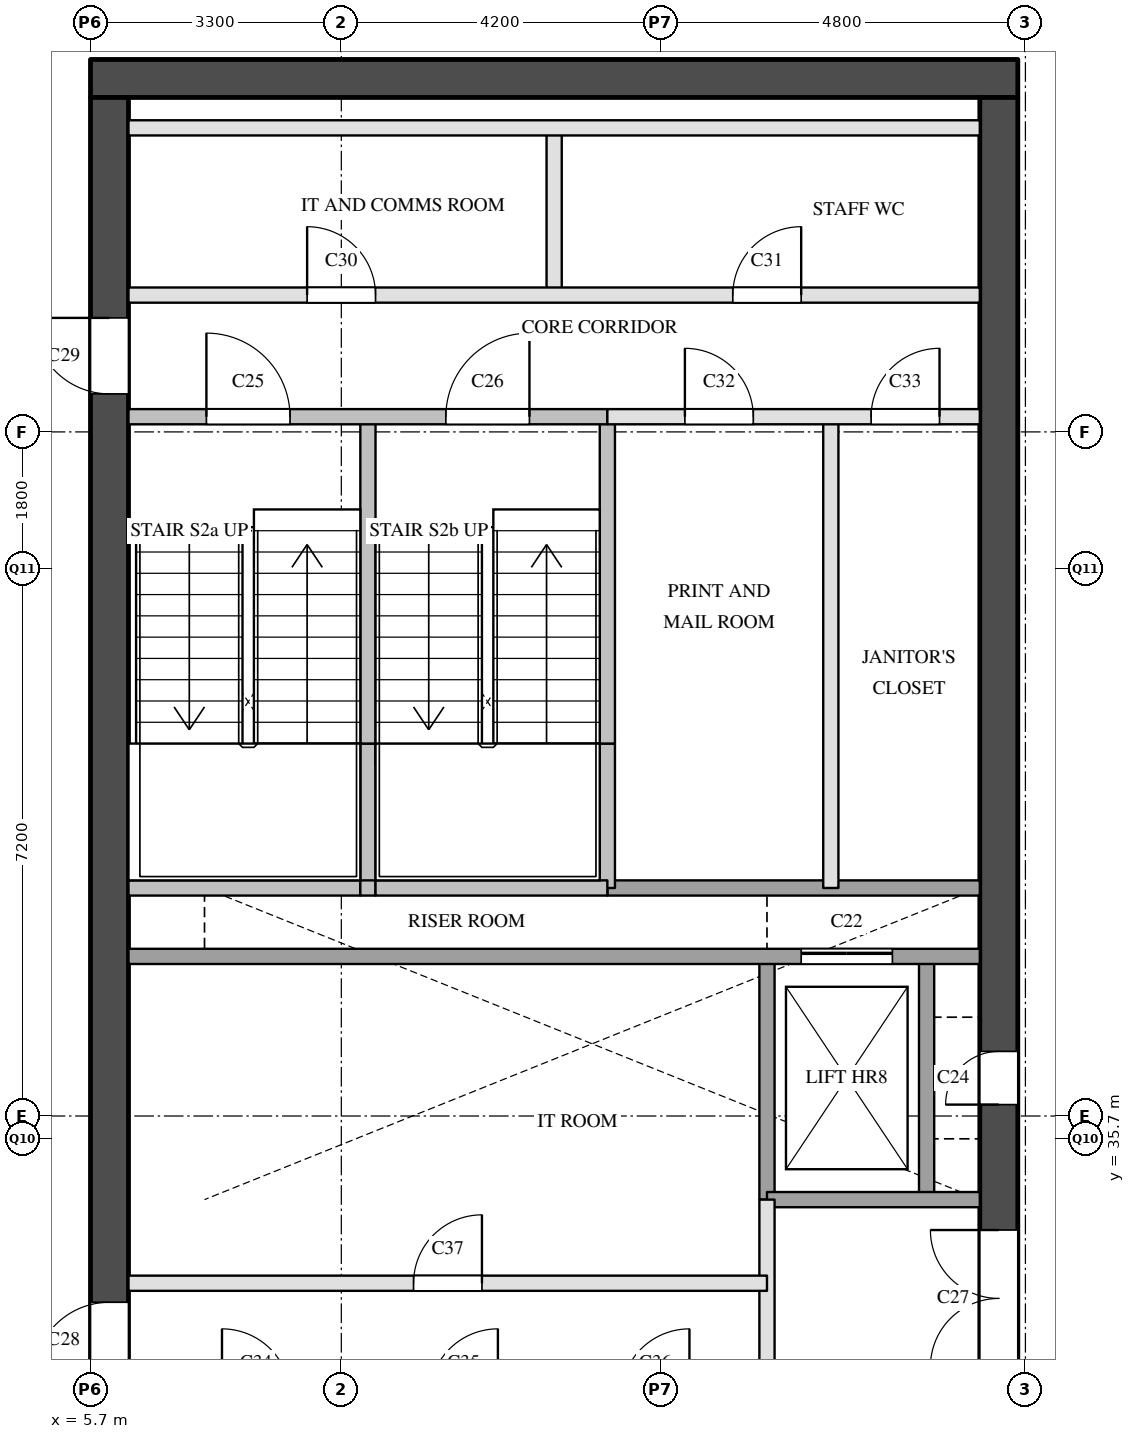
"""IFC4 building model, lengths in metres.
Left out: names, types, materials, properties, quantities, classifications, styles, units other than length and angle.
Written with IfcOpenShell. Run it as: python <this file> out.ifc"""

import sys

from ifc_helpers import new_model, si_unit, direction, frame, frame_2d, origin, place, context, subcontext, project, spatial, rectangle, extrude, element, fill, save


model = new_model("IFC4")
c1 = context("Model", 3, precision=1e-05, world=origin(), true_north=direction((0.0, 1.0)))
c2 = subcontext(c1, "Body", "Model", "MODEL_VIEW")
j1 = project(units=[si_unit("LENGTHUNIT", "METRE"), si_unit("PLANEANGLEUNIT", "RADIAN")], contexts=[c1])
p1 = place(None, origin())
s1 = spatial("IfcSite", under=j1, at=p1, CompositionType="ELEMENT")
p2 = place(p1, origin())
s2 = spatial("IfcBuilding", under=s1, at=p2, CompositionType="ELEMENT")
p3 = place(p2, frame((0.0, 0.0, 158.3)))
s3 = spatial("IfcBuildingStorey", under=s2, at=p3, CompositionType="ELEMENT", Elevation=158.3)
p4 = place(p3, frame((5.7, 49.65, 0.0), z_axis=(0.0, 0.0, 1.0), x_axis=(1.0, 0.0, 0.0)))
e1 = element("IfcWall", 1, at=p4, inside=s3, PredefinedType="SHEAR", context=c2, shape_type="SweptSolid", body=[
    extrude(rectangle(XDim=12.2, YDim=0.5, at=frame_2d((6.1, 0.0))), origin(), (0.0, 0.0, 1.0), 3.6),
])
p5 = place(p3, frame((5.95, 29.1, 0.0), z_axis=(0.0, 0.0, 1.0), x_axis=(0.0, 1.0, 0.0)))
e2 = element("IfcWall", 2, at=p5, inside=s3, PredefinedType="SHEAR", context=c2, shape_type="SweptSolid", body=[
    extrude(rectangle(XDim=20.3, YDim=0.5, at=frame_2d((10.15, 0.0))), origin(), (0.0, 0.0, 1.0), 3.6),
])
p6 = place(p5, frame((3.45, 0.0, 0.0)))
e3 = element("IfcOpeningElement", 3, at=p6, cuts=e2, PredefinedType="OPENING", context=c2, shape_type="SweptSolid", body=[
    extrude(rectangle(XDim=1.0, YDim=2.1, at=frame_2d((0.5, 1.05))), frame((0.0, 0.26, 0.0), z_axis=(0.0, -1.0, 0.0), x_axis=(1.0, 0.0, 0.0)), (0.0, 0.0, 1.0), 0.52),
])
p7 = place(p5, frame((16.4, 0.0, 0.0)))
e4 = element("IfcOpeningElement", 4, at=p7, cuts=e2, PredefinedType="OPENING", context=c2, shape_type="SweptSolid", body=[
    extrude(rectangle(XDim=1.0, YDim=2.1, at=frame_2d((0.5, 1.05))), frame((0.0, 0.26, 0.0), z_axis=(0.0, -1.0, 0.0), x_axis=(1.0, 0.0, 0.0)), (0.0, 0.0, 1.0), 0.52),
])
p8 = place(p3, frame((17.65, 29.1, 0.0), z_axis=(0.0, 0.0, 1.0), x_axis=(0.0, 1.0, 0.0)))
e5 = element("IfcWall", 5, at=p8, inside=s3, PredefinedType="SHEAR", context=c2, shape_type="SweptSolid", body=[
    extrude(rectangle(XDim=20.3, YDim=0.5, at=frame_2d((10.15, 0.0))), origin(), (0.0, 0.0, 1.0), 3.6),
])
p9 = place(p8, frame((1.25, 0.0, 0.0)))
e6 = element("IfcOpeningElement", 6, at=p9, cuts=e5, PredefinedType="OPENING", context=c2, shape_type="SweptSolid", body=[
    extrude(rectangle(XDim=0.7, YDim=2.1, at=frame_2d((0.35, 1.05))), frame((0.0, 0.26, 0.0), z_axis=(0.0, -1.0, 0.0), x_axis=(1.0, 0.0, 0.0)), (0.0, 0.0, 1.0), 0.52),
])
p10 = place(p8, frame((7.05, 0.0, 0.0)))
e7 = element("IfcOpeningElement", 7, at=p10, cuts=e5, PredefinedType="OPENING", context=c2, shape_type="SweptSolid", body=[
    extrude(rectangle(XDim=0.7, YDim=2.1, at=frame_2d((0.35, 1.05))), frame((0.0, 0.26, 0.0), z_axis=(0.0, -1.0, 0.0), x_axis=(1.0, 0.0, 0.0)), (0.0, 0.0, 1.0), 0.52),
])
p11 = place(p8, frame((3.6, 0.0, 0.0)))
e8 = element("IfcOpeningElement", 8, at=p11, cuts=e5, PredefinedType="OPENING", context=c2, shape_type="SweptSolid", body=[
    extrude(rectangle(XDim=1.8, YDim=2.1, at=frame_2d((0.9, 1.05))), frame((0.0, 0.26, 0.0), z_axis=(0.0, -1.0, 0.0), x_axis=(1.0, 0.0, 0.0)), (0.0, 0.0, 1.0), 0.52),
])
p12 = place(p3, frame((9.35, 39.0, 0.0), z_axis=(0.0, 0.0, 1.0), x_axis=(0.0, 1.0, 0.0)))
e9 = element("IfcWall", 9, at=p12, inside=s3, PredefinedType="SOLIDWALL", context=c2, shape_type="SweptSolid", body=[
    extrude(rectangle(XDim=1.9, YDim=0.2, at=frame_2d((0.95, 0.0))), origin(), (0.0, 0.0, 1.0), 3.6),
])
p13 = place(p3, frame((9.35, 40.9, 0.0), z_axis=(0.0, 0.0, 1.0), x_axis=(0.0, 1.0, 0.0)))
e10 = element("IfcWall", 10, at=p13, inside=s3, PredefinedType="SOLIDWALL", context=c2, shape_type="SweptSolid", body=[
    extrude(rectangle(XDim=4.3, YDim=0.2, at=frame_2d((2.15, 0.0))), origin(), (0.0, 0.0, 1.0), 3.6),
])
p14 = place(p3, frame((11.8, 46.8, 0.0), z_axis=(0.0, 0.0, 1.0), x_axis=(0.0, 1.0, 0.0)))
e11 = element("IfcWall", 11, at=p14, inside=s3, PredefinedType="PARTITIONING", context=c2, shape_type="SweptSolid", body=[
    extrude(rectangle(XDim=2.2, YDim=0.2, at=frame_2d((1.1, 0.0))), origin(), (0.0, 0.0, 1.0), 3.6),
])
p15 = place(p3, frame((12.5, 39.0, 0.0), z_axis=(0.0, 0.0, 1.0), x_axis=(0.0, 1.0, 0.0)))
e12 = element("IfcWall", 12, at=p15, inside=s3, PredefinedType="SOLIDWALL", context=c2, shape_type="SweptSolid", body=[
    extrude(rectangle(XDim=1.9, YDim=0.2, at=frame_2d((0.95, 0.0))), origin(), (0.0, 0.0, 1.0), 3.6),
])
p16 = place(p3, frame((12.5, 40.9, 0.0), z_axis=(0.0, 0.0, 1.0), x_axis=(0.0, 1.0, 0.0)))
e13 = element("IfcWall", 13, at=p16, inside=s3, PredefinedType="SOLIDWALL", context=c2, shape_type="SweptSolid", body=[
    extrude(rectangle(XDim=4.3, YDim=0.2, at=frame_2d((2.15, 0.0))), origin(), (0.0, 0.0, 1.0), 3.6),
])
p17 = place(p3, frame((14.6, 32.3, 0.0), z_axis=(0.0, 0.0, 1.0), x_axis=(0.0, 1.0, 0.0)))
e14 = element("IfcWall", 14, at=p17, inside=s3, PredefinedType="PARTITIONING", context=c2, shape_type="SweptSolid", body=[
    extrude(rectangle(XDim=2.6, YDim=0.2, at=frame_2d((1.3, 0.0))), origin(), (0.0, 0.0, 1.0), 3.6),
])
p18 = place(p3, frame((14.6, 34.9, 0.0), z_axis=(0.0, 0.0, 1.0), x_axis=(0.0, 1.0, 0.0)))
e15 = element("IfcWall", 15, at=p18, inside=s3, PredefinedType="SOLIDWALL", context=c2, shape_type="SweptSolid", body=[
    extrude(rectangle(XDim=3.2, YDim=0.2, at=frame_2d((1.6, 0.0))), origin(), (0.0, 0.0, 1.0), 3.6),
])
p19 = place(p3, frame((15.44, 39.0, 0.0), z_axis=(0.0, 0.0, 1.0), x_axis=(0.0, 1.0, 0.0)))
e16 = element("IfcWall", 16, at=p19, inside=s3, PredefinedType="PARTITIONING", context=c2, shape_type="SweptSolid", body=[
    extrude(rectangle(XDim=6.2, YDim=0.2, at=frame_2d((3.1, 0.0))), origin(), (0.0, 0.0, 1.0), 3.6),
])
p20 = place(p3, frame((16.7, 34.9, 0.0), z_axis=(0.0, 0.0, 1.0), x_axis=(0.0, 1.0, 0.0)))
e17 = element("IfcWall", 17, at=p20, inside=s3, PredefinedType="SOLIDWALL", context=c2, shape_type="SweptSolid", body=[
    extrude(rectangle(XDim=3.2, YDim=0.2, at=frame_2d((1.6, 0.0))), origin(), (0.0, 0.0, 1.0), 3.6),
])
p21 = place(p3, frame((6.2, 33.8, 0.0), z_axis=(0.0, 0.0, 1.0), x_axis=(1.0, 0.0, 0.0)))
e18 = element("IfcWall", 18, at=p21, inside=s3, PredefinedType="PARTITIONING", context=c2, shape_type="SweptSolid", body=[
    extrude(rectangle(XDim=8.4, YDim=0.2, at=frame_2d((4.2, 0.0))), origin(), (0.0, 0.0, 1.0), 3.6),
])
p22 = place(p21, frame((3.75, 0.0, 0.0)))
e19 = element("IfcOpeningElement", 19, at=p22, cuts=e18, PredefinedType="OPENING", context=c2, shape_type="SweptSolid", body=[
    extrude(rectangle(XDim=0.9, YDim=2.1, at=frame_2d((0.45, 1.05))), frame((0.0, 0.11, 0.0), z_axis=(0.0, -1.0, 0.0), x_axis=(1.0, 0.0, 0.0)), (0.0, 0.0, 1.0), 0.22),
])
p23 = place(p3, frame((14.6, 34.9, 0.0), z_axis=(0.0, 0.0, 1.0), x_axis=(1.0, 0.0, 0.0)))
e20 = element("IfcWall", 20, at=p23, inside=s3, PredefinedType="SOLIDWALL", context=c2, shape_type="SweptSolid", body=[
    extrude(rectangle(XDim=2.8, YDim=0.2, at=frame_2d((1.4, 0.0))), origin(), (0.0, 0.0, 1.0), 3.6),
])
p24 = place(p3, frame((6.2, 38.1, 0.0), z_axis=(0.0, 0.0, 1.0), x_axis=(1.0, 0.0, 0.0)))
e21 = element("IfcWall", 21, at=p24, inside=s3, PredefinedType="SOLIDWALL", context=c2, shape_type="SweptSolid", body=[
    extrude(rectangle(XDim=11.2, YDim=0.2, at=frame_2d((5.6, 0.0))), origin(), (0.0, 0.0, 1.0), 3.6),
])
p25 = place(p24, frame((8.85, 0.0, 0.0)))
e22 = element("IfcOpeningElement", 22, at=p25, cuts=e21, PredefinedType="OPENING", context=c2, shape_type="SweptSolid", body=[
    extrude(rectangle(XDim=1.2, YDim=2.1, at=frame_2d((0.6, 1.05))), frame((0.0, 0.11, 0.0), z_axis=(0.0, -1.0, 0.0), x_axis=(1.0, 0.0, 0.0)), (0.0, 0.0, 1.0), 0.22),
])
p26 = place(p3, frame((12.5, 39.0, 0.0), z_axis=(0.0, 0.0, 1.0), x_axis=(1.0, 0.0, 0.0)))
e23 = element("IfcWall", 23, at=p26, inside=s3, PredefinedType="SOLIDWALL", context=c2, shape_type="SweptSolid", body=[
    extrude(rectangle(XDim=4.9, YDim=0.2, at=frame_2d((2.45, 0.0))), origin(), (0.0, 0.0, 1.0), 3.6),
])
p27 = place(p3, frame((6.2, 39.0, 0.0), z_axis=(0.0, 0.0, 1.0), x_axis=(1.0, 0.0, 0.0)))
e24 = element("IfcWall", 24, at=p27, inside=s3, PredefinedType="SOLIDWALL", context=c2, shape_type="SweptSolid", body=[
    extrude(rectangle(XDim=3.05, YDim=0.2, at=frame_2d((1.525, 0.0))), origin(), (0.0, 0.0, 1.0), 3.6),
])
p28 = place(p3, frame((9.25, 39.0, 0.0), z_axis=(0.0, 0.0, 1.0), x_axis=(1.0, 0.0, 0.0)))
e25 = element("IfcWall", 25, at=p28, inside=s3, PredefinedType="SOLIDWALL", context=c2, shape_type="SweptSolid", body=[
    extrude(rectangle(XDim=0.2, YDim=0.2, at=frame_2d((0.1, 0.0))), origin(), (0.0, 0.0, 1.0), 3.6),
])
p29 = place(p3, frame((9.45, 39.0, 0.0), z_axis=(0.0, 0.0, 1.0), x_axis=(1.0, 0.0, 0.0)))
e26 = element("IfcWall", 26, at=p29, inside=s3, PredefinedType="SOLIDWALL", context=c2, shape_type="SweptSolid", body=[
    extrude(rectangle(XDim=3.05, YDim=0.2, at=frame_2d((1.525, 0.0))), origin(), (0.0, 0.0, 1.0), 3.6),
])
p30 = place(p3, frame((12.5, 45.2, 0.0), z_axis=(0.0, 0.0, 1.0), x_axis=(1.0, 0.0, 0.0)))
e27 = element("IfcWall", 27, at=p30, inside=s3, PredefinedType="PARTITIONING", context=c2, shape_type="SweptSolid", body=[
    extrude(rectangle(XDim=4.9, YDim=0.2, at=frame_2d((2.45, 0.0))), origin(), (0.0, 0.0, 1.0), 3.6),
])
p31 = place(p30, frame((1.02, 0.0, 0.0)))
e28 = element("IfcOpeningElement", 28, at=p31, cuts=e27, PredefinedType="OPENING", context=c2, shape_type="SweptSolid", body=[
    extrude(rectangle(XDim=0.9, YDim=2.1, at=frame_2d((0.45, 1.05))), frame((0.0, 0.11, 0.0), z_axis=(0.0, -1.0, 0.0), x_axis=(1.0, 0.0, 0.0)), (0.0, 0.0, 1.0), 0.22),
])
p32 = place(p30, frame((3.47, 0.0, 0.0)))
e29 = element("IfcOpeningElement", 29, at=p32, cuts=e27, PredefinedType="OPENING", context=c2, shape_type="SweptSolid", body=[
    extrude(rectangle(XDim=0.9, YDim=2.1, at=frame_2d((0.45, 1.05))), frame((0.0, 0.11, 0.0), z_axis=(0.0, -1.0, 0.0), x_axis=(1.0, 0.0, 0.0)), (0.0, 0.0, 1.0), 0.22),
])
p33 = place(p3, frame((6.2, 45.2, 0.0), z_axis=(0.0, 0.0, 1.0), x_axis=(1.0, 0.0, 0.0)))
e30 = element("IfcWall", 30, at=p33, inside=s3, PredefinedType="SOLIDWALL", context=c2, shape_type="SweptSolid", body=[
    extrude(rectangle(XDim=6.3, YDim=0.2, at=frame_2d((3.15, 0.0))), origin(), (0.0, 0.0, 1.0), 3.6),
])
p34 = place(p33, frame((1.025, 0.0, 0.0)))
e31 = element("IfcOpeningElement", 31, at=p34, cuts=e30, PredefinedType="OPENING", context=c2, shape_type="SweptSolid", body=[
    extrude(rectangle(XDim=1.1, YDim=2.1, at=frame_2d((0.55, 1.05))), frame((0.0, 0.11, 0.0), z_axis=(0.0, -1.0, 0.0), x_axis=(1.0, 0.0, 0.0)), (0.0, 0.0, 1.0), 0.22),
])
p35 = place(p33, frame((4.175, 0.0, 0.0)))
e32 = element("IfcOpeningElement", 32, at=p35, cuts=e30, PredefinedType="OPENING", context=c2, shape_type="SweptSolid", body=[
    extrude(rectangle(XDim=1.1, YDim=2.1, at=frame_2d((0.55, 1.05))), frame((0.0, 0.11, 0.0), z_axis=(0.0, -1.0, 0.0), x_axis=(1.0, 0.0, 0.0)), (0.0, 0.0, 1.0), 0.22),
])
p36 = place(p3, frame((6.2, 46.8, 0.0), z_axis=(0.0, 0.0, 1.0), x_axis=(1.0, 0.0, 0.0)))
e33 = element("IfcWall", 33, at=p36, inside=s3, PredefinedType="PARTITIONING", context=c2, shape_type="SweptSolid", body=[
    extrude(rectangle(XDim=11.2, YDim=0.2, at=frame_2d((5.6, 0.0))), origin(), (0.0, 0.0, 1.0), 3.6),
])
p37 = place(p36, frame((2.35, 0.0, 0.0)))
e34 = element("IfcOpeningElement", 34, at=p37, cuts=e33, PredefinedType="OPENING", context=c2, shape_type="SweptSolid", body=[
    extrude(rectangle(XDim=0.9, YDim=2.1, at=frame_2d((0.45, 1.05))), frame((0.0, 0.11, 0.0), z_axis=(0.0, -1.0, 0.0), x_axis=(1.0, 0.0, 0.0)), (0.0, 0.0, 1.0), 0.22),
])
p38 = place(p36, frame((7.95, 0.0, 0.0)))
e35 = element("IfcOpeningElement", 35, at=p38, cuts=e33, PredefinedType="OPENING", context=c2, shape_type="SweptSolid", body=[
    extrude(rectangle(XDim=0.9, YDim=2.1, at=frame_2d((0.45, 1.05))), frame((0.0, 0.11, 0.0), z_axis=(0.0, -1.0, 0.0), x_axis=(1.0, 0.0, 0.0)), (0.0, 0.0, 1.0), 0.22),
])
p39 = place(p3, frame((6.2, 49.0, 0.0), z_axis=(0.0, 0.0, 1.0), x_axis=(1.0, 0.0, 0.0)))
e36 = element("IfcWall", 36, at=p39, inside=s3, PredefinedType="PARTITIONING", context=c2, shape_type="SweptSolid", body=[
    extrude(rectangle(XDim=11.2, YDim=0.2, at=frame_2d((5.6, 0.0))), origin(), (0.0, 0.0, 1.0), 3.6),
])
p40 = place(p25, origin())
e37 = element("IfcDoor", 37, at=p40, inside=s3, OperationType="SLIDING_TO_LEFT", PredefinedType="DOOR", context=c2, shape_type="SweptSolid", body=[
    extrude(rectangle(XDim=1.2, YDim=2.1, at=frame_2d((0.6, 1.05))), frame((0.0, 0.025, 0.0), z_axis=(0.0, -1.0, 0.0), x_axis=(1.0, 0.0, 0.0)), (0.0, 0.0, 1.0), 0.05),
])
fill(e22, e37)
p41 = place(p10, origin())
e38 = element("IfcDoor", 38, at=p41, inside=s3, OperationType="SINGLE_SWING_LEFT", PredefinedType="DOOR", context=c2, shape_type="SweptSolid", body=[
    extrude(rectangle(XDim=0.7, YDim=2.1, at=frame_2d((0.35, 1.05))), frame((0.0, 0.025, 0.0), z_axis=(0.0, -1.0, 0.0), x_axis=(1.0, 0.0, 0.0)), (0.0, 0.0, 1.0), 0.05),
])
fill(e7, e38)
p42 = place(p34, origin())
e39 = element("IfcDoor", 39, at=p42, inside=s3, OperationType="SINGLE_SWING_LEFT", PredefinedType="DOOR", context=c2, shape_type="SweptSolid", body=[
    extrude(rectangle(XDim=1.1, YDim=2.1, at=frame_2d((0.55, 1.05))), frame((0.0, 0.025, 0.0), z_axis=(0.0, -1.0, 0.0), x_axis=(1.0, 0.0, 0.0)), (0.0, 0.0, 1.0), 0.05),
])
fill(e31, e39)
p43 = place(p35, origin())
e40 = element("IfcDoor", 40, at=p43, inside=s3, OperationType="SINGLE_SWING_RIGHT", PredefinedType="DOOR", context=c2, shape_type="SweptSolid", body=[
    extrude(rectangle(XDim=1.1, YDim=2.1, at=frame_2d((0.55, 1.05))), frame((0.0, 0.025, 0.0), z_axis=(0.0, -1.0, 0.0), x_axis=(1.0, 0.0, 0.0)), (0.0, 0.0, 1.0), 0.05),
])
fill(e32, e40)
p44 = place(p11, origin())
e41 = element("IfcDoor", 41, at=p44, inside=s3, OperationType="DOUBLE_DOOR_SINGLE_SWING", PredefinedType="DOOR", context=c2, shape_type="SweptSolid", body=[
    extrude(rectangle(XDim=1.8, YDim=2.1, at=frame_2d((0.9, 1.05))), frame((0.0, 0.025, 0.0), z_axis=(0.0, -1.0, 0.0), x_axis=(1.0, 0.0, 0.0)), (0.0, 0.0, 1.0), 0.05),
])
fill(e8, e41)
p45 = place(p6, origin())
e42 = element("IfcDoor", 42, at=p45, inside=s3, OperationType="SINGLE_SWING_LEFT", PredefinedType="DOOR", context=c2, shape_type="SweptSolid", body=[
    extrude(rectangle(XDim=1.0, YDim=2.1, at=frame_2d((0.5, 1.05))), frame((0.0, 0.025, 0.0), z_axis=(0.0, -1.0, 0.0), x_axis=(1.0, 0.0, 0.0)), (0.0, 0.0, 1.0), 0.05),
])
fill(e3, e42)
p46 = place(p7, origin())
e43 = element("IfcDoor", 43, at=p46, inside=s3, OperationType="SINGLE_SWING_RIGHT", PredefinedType="DOOR", context=c2, shape_type="SweptSolid", body=[
    extrude(rectangle(XDim=1.0, YDim=2.1, at=frame_2d((0.5, 1.05))), frame((0.0, 0.025, 0.0), z_axis=(0.0, -1.0, 0.0), x_axis=(1.0, 0.0, 0.0)), (0.0, 0.0, 1.0), 0.05),
])
fill(e4, e43)
p47 = place(p37, origin())
e44 = element("IfcDoor", 44, at=p47, inside=s3, OperationType="SINGLE_SWING_LEFT", PredefinedType="DOOR", context=c2, shape_type="SweptSolid", body=[
    extrude(rectangle(XDim=0.9, YDim=2.1, at=frame_2d((0.45, 1.05))), frame((0.0, 0.025, 0.0), z_axis=(0.0, -1.0, 0.0), x_axis=(1.0, 0.0, 0.0)), (0.0, 0.0, 1.0), 0.05),
])
fill(e34, e44)
p48 = place(p38, origin())
e45 = element("IfcDoor", 45, at=p48, inside=s3, OperationType="SINGLE_SWING_RIGHT", PredefinedType="DOOR", context=c2, shape_type="SweptSolid", body=[
    extrude(rectangle(XDim=0.9, YDim=2.1, at=frame_2d((0.45, 1.05))), frame((0.0, 0.025, 0.0), z_axis=(0.0, -1.0, 0.0), x_axis=(1.0, 0.0, 0.0)), (0.0, 0.0, 1.0), 0.05),
])
fill(e35, e45)
p49 = place(p31, origin())
e46 = element("IfcDoor", 46, at=p49, inside=s3, OperationType="SINGLE_SWING_LEFT", PredefinedType="DOOR", context=c2, shape_type="SweptSolid", body=[
    extrude(rectangle(XDim=0.9, YDim=2.1, at=frame_2d((0.45, 1.05))), frame((0.0, 0.025, 0.0), z_axis=(0.0, -1.0, 0.0), x_axis=(1.0, 0.0, 0.0)), (0.0, 0.0, 1.0), 0.05),
])
fill(e28, e46)
p50 = place(p32, origin())
e47 = element("IfcDoor", 47, at=p50, inside=s3, OperationType="SINGLE_SWING_RIGHT", PredefinedType="DOOR", context=c2, shape_type="SweptSolid", body=[
    extrude(rectangle(XDim=0.9, YDim=2.1, at=frame_2d((0.45, 1.05))), frame((0.0, 0.025, 0.0), z_axis=(0.0, -1.0, 0.0), x_axis=(1.0, 0.0, 0.0)), (0.0, 0.0, 1.0), 0.05),
])
fill(e29, e47)
p51 = place(p22, origin())
e48 = element("IfcDoor", 48, at=p51, inside=s3, OperationType="SINGLE_SWING_RIGHT", PredefinedType="DOOR", context=c2, shape_type="SweptSolid", body=[
    extrude(rectangle(XDim=0.9, YDim=2.1, at=frame_2d((0.45, 1.05))), frame((0.0, 0.025, 0.0), z_axis=(0.0, -1.0, 0.0), x_axis=(1.0, 0.0, 0.0)), (0.0, 0.0, 1.0), 0.05),
])
fill(e19, e48)
save(model, sys.argv[1])
